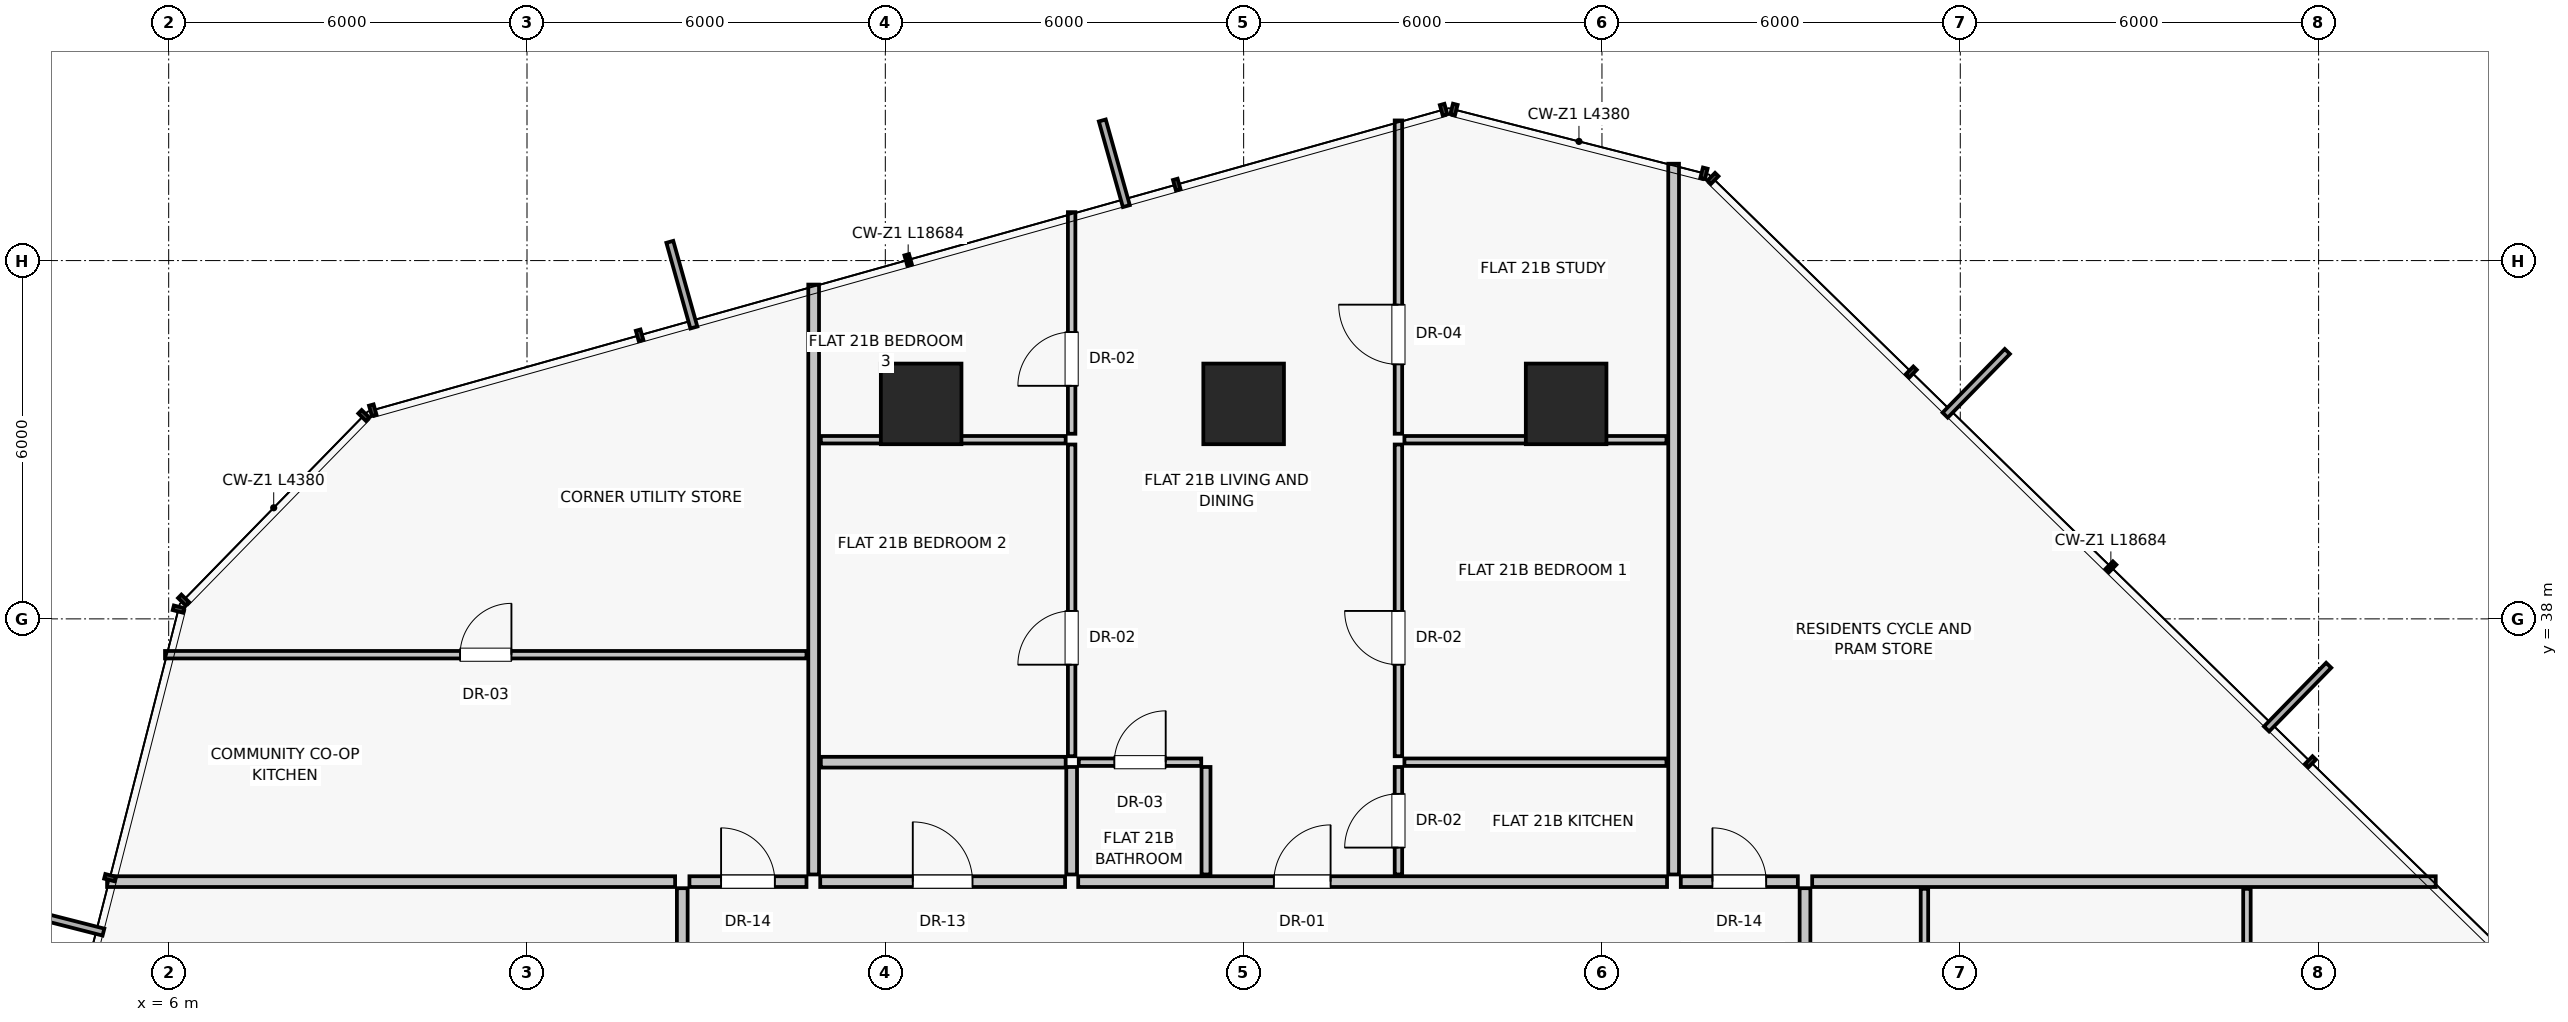
"""IFC4 building model, lengths in metres.
Left out: names, types, materials, properties, quantities, classifications, styles, units other than length and angle.
Written with IfcOpenShell. Run it as: python <this file> out.ifc"""

import sys

from ifc_helpers import new_model, si_unit, direction, frame, frame_2d, origin, origin_2d, place, context, subcontext, project, spatial, rectangle, extrude, source, transform, mapped, element, fill, save


model = new_model("IFC4")
c1 = context("Model", 3, precision=1e-05, world=origin(), true_north=direction((0.0, 1.0)))
c2 = subcontext(c1, "Body", "Model", "MODEL_VIEW")
j1 = project(units=[si_unit("LENGTHUNIT", "METRE"), si_unit("PLANEANGLEUNIT", "RADIAN")], contexts=[c1])
p1 = place(None, origin())
s1 = spatial("IfcSite", under=j1, at=p1, CompositionType="ELEMENT")
p2 = place(p1, origin())
s2 = spatial("IfcBuilding", under=s1, at=p2, CompositionType="ELEMENT")
p3 = place(p2, frame((0.0, 0.0, 77.1)))
s3 = spatial("IfcBuildingStorey", under=s2, at=p3, CompositionType="ELEMENT", Elevation=77.1)
for number, where, z_axis, x_axis in (
    (1, (29.4, 41.6, 0.0), (0.0, 0.0, 1.0), (1.0, 0.0, 0.0)),
    (2, (24.0, 41.6, 0.0), (0.0, 0.0, 1.0), (1.0, 0.0, 0.0)),
    (3, (18.6, 41.6, 0.0), (0.0, 0.0, 1.0), (1.0, 0.0, 0.0)),
):
    element("IfcColumn", number, at=place(p3, frame(where, z_axis=z_axis, x_axis=x_axis)), inside=s3, PredefinedType="COLUMN", context=c2, shape_type="SweptSolid", body=[
        extrude(rectangle(XDim=1.35, YDim=1.35, at=origin_2d()), origin(), (0.0, 0.0, 1.0), 3.25),
    ])
p4 = place(p3, frame((16.8, 33.72, 0.0), z_axis=(0.0, 0.0, 1.0), x_axis=(0.0, 1.0, 0.0)))
e4 = element("IfcWall", 4, at=p4, inside=s3, PredefinedType="PARTITIONING", context=c2, shape_type="SweptSolid", body=[
    extrude(rectangle(XDim=9.878, YDim=0.18, at=frame_2d((4.939, 0.0))), origin(), (0.0, 0.0, 1.0), 2.93),
])
p5 = place(p3, frame((31.2, 33.72, 0.0), z_axis=(0.0, 0.0, 1.0), x_axis=(0.0, 1.0, 0.0)))
e5 = element("IfcWall", 5, at=p5, inside=s3, PredefinedType="PARTITIONING", context=c2, shape_type="SweptSolid", body=[
    extrude(rectangle(XDim=11.902, YDim=0.18, at=frame_2d((5.951, 0.0))), origin(), (0.0, 0.0, 1.0), 2.93),
])
p6 = place(p3, frame((16.91, 33.6, 0.0), z_axis=(0.0, 0.0, 1.0), x_axis=(1.0, 0.0, 0.0)))
e6 = element("IfcWall", 6, at=p6, inside=s3, PredefinedType="PARTITIONING", context=c2, shape_type="SweptSolid", body=[
    extrude(rectangle(XDim=4.1, YDim=0.18, at=frame_2d((2.05, 0.0))), origin(), (0.0, 0.0, 1.0), 2.93),
])
p7 = place(p6, frame((1.55, 0.0, 0.0)))
e7 = element("IfcOpeningElement", 7, at=p7, cuts=e6, PredefinedType="OPENING", context=c2, shape_type="SweptSolid", body=[
    extrude(rectangle(XDim=1.0, YDim=2.01, at=frame_2d((0.5, 1.005))), frame((0.0, 0.1, 0.0), z_axis=(0.0, -1.0, 0.0), x_axis=(1.0, 0.0, 0.0)), (0.0, 0.0, 1.0), 0.2),
])
p8 = place(p3, frame((21.23, 33.6, 0.0), z_axis=(0.0, 0.0, 1.0), x_axis=(1.0, 0.0, 0.0)))
e8 = element("IfcWall", 8, at=p8, inside=s3, PredefinedType="PARTITIONING", context=c2, shape_type="SweptSolid", body=[
    extrude(rectangle(XDim=9.86, YDim=0.18, at=frame_2d((4.93, 0.0))), origin(), (0.0, 0.0, 1.0), 2.93),
])
p9 = place(p8, frame((3.276, 0.0, 0.0)))
e9 = element("IfcOpeningElement", 9, at=p9, cuts=e8, PredefinedType="OPENING", context=c2, shape_type="SweptSolid", body=[
    extrude(rectangle(XDim=0.95, YDim=2.02, at=frame_2d((0.475, 1.01))), frame((0.0, 0.1, 0.0), z_axis=(0.0, -1.0, 0.0), x_axis=(1.0, 0.0, 0.0)), (0.0, 0.0, 1.0), 0.2),
])
p10 = place(p3, frame((16.92, 41.0, 0.0), z_axis=(0.0, 0.0, 1.0), x_axis=(1.0, 0.0, 0.0)))
e10 = element("IfcWall", 10, at=p10, inside=s3, PredefinedType="PARTITIONING", context=c2, shape_type="SweptSolid", body=[
    extrude(rectangle(XDim=4.1, YDim=0.125, at=frame_2d((2.05, 0.0))), origin(), (0.0, 0.0, 1.0), 2.08),
])
p11 = place(p3, frame((21.12, 41.1, 0.0), z_axis=(0.0, 0.0, 1.0), x_axis=(0.0, 1.0, 0.0)))
e11 = element("IfcWall", 11, at=p11, inside=s3, PredefinedType="PARTITIONING", context=c2, shape_type="SweptSolid", body=[
    extrude(rectangle(XDim=3.711, YDim=0.125, at=frame_2d((1.855, 0.0))), origin(), (0.0, 0.0, 1.0), 2.93),
])
p12 = place(p11, frame((0.803, 0.0, 0.0)))
e12 = element("IfcOpeningElement", 12, at=p12, cuts=e11, PredefinedType="OPENING", context=c2, shape_type="SweptSolid", body=[
    extrude(rectangle(XDim=0.9, YDim=2.01, at=frame_2d((0.45, 1.005))), frame((0.0, 0.073, 0.0), z_axis=(0.0, -1.0, 0.0), x_axis=(1.0, 0.0, 0.0)), (0.0, 0.0, 1.0), 0.145),
])
p13 = place(p3, frame((26.692, 41.0, 0.0), z_axis=(0.0, 0.0, 1.0), x_axis=(1.0, 0.0, 0.0)))
e13 = element("IfcWall", 13, at=p13, inside=s3, PredefinedType="PARTITIONING", context=c2, shape_type="SweptSolid", body=[
    extrude(rectangle(XDim=4.388, YDim=0.125, at=frame_2d((2.194, 0.0))), origin(), (0.0, 0.0, 1.0), 2.08),
])
p14 = place(p3, frame((26.592, 41.1, 0.0), z_axis=(0.0, 0.0, 1.0), x_axis=(0.0, 1.0, 0.0)))
e14 = element("IfcWall", 14, at=p14, inside=s3, PredefinedType="PARTITIONING", context=c2, shape_type="SweptSolid", body=[
    extrude(rectangle(XDim=5.247, YDim=0.125, at=frame_2d((2.623, 0.0))), origin(), (0.0, 0.0, 1.0), 2.93),
])
p15 = place(p14, frame((1.162, 0.0, 0.0)))
e15 = element("IfcOpeningElement", 15, at=p15, cuts=e14, PredefinedType="OPENING", context=c2, shape_type="SweptSolid", body=[
    extrude(rectangle(XDim=1.0, YDim=2.01, at=frame_2d((0.5, 1.005))), frame((0.0, 0.073, 0.0), z_axis=(0.0, -1.0, 0.0), x_axis=(1.0, 0.0, 0.0)), (0.0, 0.0, 1.0), 0.145),
])
p16 = place(p3, frame((16.92, 35.6, 0.0), z_axis=(0.0, 0.0, 1.0), x_axis=(1.0, 0.0, 0.0)))
e16 = element("IfcWall", 16, at=p16, inside=s3, PredefinedType="PARTITIONING", context=c2, shape_type="SweptSolid", body=[
    extrude(rectangle(XDim=4.1, YDim=0.18, at=frame_2d((2.05, 0.0))), origin(), (0.0, 0.0, 1.0), 2.93),
])
p17 = place(p3, frame((21.12, 33.72, 0.0), z_axis=(0.0, 0.0, 1.0), x_axis=(0.0, 1.0, 0.0)))
e17 = element("IfcWall", 17, at=p17, inside=s3, PredefinedType="PARTITIONING", context=c2, shape_type="SweptSolid", body=[
    extrude(rectangle(XDim=1.8, YDim=0.18, at=frame_2d((0.9, 0.0))), origin(), (0.0, 0.0, 1.0), 2.93),
])
p18 = place(p3, frame((21.12, 35.7, 0.0), z_axis=(0.0, 0.0, 1.0), x_axis=(0.0, 1.0, 0.0)))
e18 = element("IfcWall", 18, at=p18, inside=s3, PredefinedType="PARTITIONING", context=c2, shape_type="SweptSolid", body=[
    extrude(rectangle(XDim=5.22, YDim=0.125, at=frame_2d((2.61, 0.0))), origin(), (0.0, 0.0, 1.0), 2.93),
])
p19 = place(p18, frame((1.533, 0.0, 0.0)))
e19 = element("IfcOpeningElement", 19, at=p19, cuts=e18, PredefinedType="OPENING", context=c2, shape_type="SweptSolid", body=[
    extrude(rectangle(XDim=0.9, YDim=2.01, at=frame_2d((0.45, 1.005))), frame((0.0, 0.073, 0.0), z_axis=(0.0, -1.0, 0.0), x_axis=(1.0, 0.0, 0.0)), (0.0, 0.0, 1.0), 0.145),
])
p20 = place(p3, frame((23.37, 33.72, 0.0), z_axis=(0.0, 0.0, 1.0), x_axis=(0.0, 1.0, 0.0)))
e20 = element("IfcWall", 20, at=p20, inside=s3, PredefinedType="PARTITIONING", context=c2, shape_type="SweptSolid", body=[
    extrude(rectangle(XDim=1.8, YDim=0.15, at=frame_2d((0.9, 0.0))), origin(), (0.0, 0.0, 1.0), 2.93),
])
p21 = place(p3, frame((21.24, 35.6, 0.0), z_axis=(0.0, 0.0, 1.0), x_axis=(1.0, 0.0, 0.0)))
e21 = element("IfcWall", 21, at=p21, inside=s3, PredefinedType="PARTITIONING", context=c2, shape_type="SweptSolid", body=[
    extrude(rectangle(XDim=2.05, YDim=0.125, at=frame_2d((1.025, 0.0))), origin(), (0.0, 0.0, 1.0), 2.93),
])
p22 = place(p21, frame((0.595, 0.0, 0.0)))
e22 = element("IfcOpeningElement", 22, at=p22, cuts=e21, PredefinedType="OPENING", context=c2, shape_type="SweptSolid", body=[
    extrude(rectangle(XDim=0.86, YDim=2.01, at=frame_2d((0.43, 1.005))), frame((0.0, 0.073, 0.0), z_axis=(0.0, -1.0, 0.0), x_axis=(1.0, 0.0, 0.0)), (0.0, 0.0, 1.0), 0.145),
])
p23 = place(p3, frame((26.592, 33.72, 0.0), z_axis=(0.0, 0.0, 1.0), x_axis=(0.0, 1.0, 0.0)))
e23 = element("IfcWall", 23, at=p23, inside=s3, PredefinedType="PARTITIONING", context=c2, shape_type="SweptSolid", body=[
    extrude(rectangle(XDim=1.8, YDim=0.125, at=frame_2d((0.9, 0.0))), origin(), (0.0, 0.0, 1.0), 2.93),
])
p24 = place(p23, frame((0.45, 0.0, 0.0)))
e24 = element("IfcOpeningElement", 24, at=p24, cuts=e23, PredefinedType="OPENING", context=c2, shape_type="SweptSolid", body=[
    extrude(rectangle(XDim=0.9, YDim=2.01, at=frame_2d((0.45, 1.005))), frame((0.0, 0.073, 0.0), z_axis=(0.0, -1.0, 0.0), x_axis=(1.0, 0.0, 0.0)), (0.0, 0.0, 1.0), 0.145),
])
p25 = place(p3, frame((26.692, 35.6, 0.0), z_axis=(0.0, 0.0, 1.0), x_axis=(1.0, 0.0, 0.0)))
e25 = element("IfcWall", 25, at=p25, inside=s3, PredefinedType="PARTITIONING", context=c2, shape_type="SweptSolid", body=[
    extrude(rectangle(XDim=4.388, YDim=0.125, at=frame_2d((2.194, 0.0))), origin(), (0.0, 0.0, 1.0), 2.93),
])
p26 = place(p3, frame((26.592, 35.7, 0.0), z_axis=(0.0, 0.0, 1.0), x_axis=(0.0, 1.0, 0.0)))
e26 = element("IfcWall", 26, at=p26, inside=s3, PredefinedType="PARTITIONING", context=c2, shape_type="SweptSolid", body=[
    extrude(rectangle(XDim=5.22, YDim=0.125, at=frame_2d((2.61, 0.0))), origin(), (0.0, 0.0, 1.0), 2.93),
])
p27 = place(p26, frame((1.533, 0.0, 0.0)))
e27 = element("IfcOpeningElement", 27, at=p27, cuts=e26, PredefinedType="OPENING", context=c2, shape_type="SweptSolid", body=[
    extrude(rectangle(XDim=0.9, YDim=2.01, at=frame_2d((0.45, 1.005))), frame((0.0, 0.073, 0.0), z_axis=(0.0, -1.0, 0.0), x_axis=(1.0, 0.0, 0.0)), (0.0, 0.0, 1.0), 0.145),
])
p28 = place(p3, frame((14.48, 33.6, 0.0), z_axis=(0.0, 0.0, 1.0), x_axis=(-1.0, 0.0, 0.0)))
e28 = element("IfcWall", 28, at=p28, inside=s3, PredefinedType="PARTITIONING", context=c2, shape_type="SweptSolid", body=[
    extrude(rectangle(XDim=9.511, YDim=0.18, at=frame_2d((4.756, 0.0))), origin(), (0.0, 0.0, 1.0), 2.93),
])
p29 = place(p3, frame((14.6, 24.11, 0.0), z_axis=(0.0, 0.0, 1.0), x_axis=(0.0, 1.0, 0.0)))
e29 = element("IfcWall", 29, at=p29, inside=s3, PredefinedType="PARTITIONING", context=c2, shape_type="SweptSolid", body=[
    extrude(rectangle(XDim=9.38, YDim=0.18, at=frame_2d((4.69, 0.0))), origin(), (0.0, 0.0, 1.0), 2.93),
])
p30 = place(p29, frame((4.19, 0.0, 0.0)))
e30 = element("IfcOpeningElement", 30, at=p30, cuts=e29, PredefinedType="OPENING", context=c2, shape_type="SweptSolid", body=[
    extrude(rectangle(XDim=1.0, YDim=2.01, at=frame_2d((0.5, 1.005))), frame((0.0, 0.1, 0.0), z_axis=(0.0, -1.0, 0.0), x_axis=(1.0, 0.0, 0.0)), (0.0, 0.0, 1.0), 0.2),
])
p31 = place(p3, frame((33.52, 33.6, 0.0), z_axis=(0.0, 0.0, 1.0), x_axis=(1.0, 0.0, 0.0)))
e31 = element("IfcWall", 31, at=p31, inside=s3, PredefinedType="PARTITIONING", context=c2, shape_type="SweptSolid", body=[
    extrude(rectangle(XDim=10.441, YDim=0.18, at=frame_2d((5.221, 0.0))), origin(), (0.0, 0.0, 1.0), 2.93),
])
p32 = place(p3, frame((33.4, 18.71, 0.0), z_axis=(0.0, 0.0, 1.0), x_axis=(0.0, 1.0, 0.0)))
e32 = element("IfcWall", 32, at=p32, inside=s3, PredefinedType="PARTITIONING", context=c2, shape_type="SweptSolid", body=[
    extrude(rectangle(XDim=14.78, YDim=0.18, at=frame_2d((7.39, 0.0))), origin(), (0.0, 0.0, 1.0), 2.93),
])
p33 = place(p32, frame((5.94, 0.0, 0.0)))
e33 = element("IfcOpeningElement", 33, at=p33, cuts=e32, PredefinedType="OPENING", context=c2, shape_type="SweptSolid", body=[
    extrude(rectangle(XDim=0.95, YDim=2.02, at=frame_2d((0.475, 1.01))), frame((0.0, 0.1, 0.0), z_axis=(0.0, -1.0, 0.0), x_axis=(1.0, 0.0, 0.0)), (0.0, 0.0, 1.0), 0.2),
])
for number, where, z_axis, x_axis in (
    (34, (40.8, 29.5, 0.0), (0.0, 0.0, 1.0), (0.0, 1.0, 0.0)),
    (35, (35.4, 29.5, 0.0), (0.0, 0.0, 1.0), (0.0, 1.0, 0.0)),
):
    element("IfcWall", number, at=place(p3, frame(where, z_axis=z_axis, x_axis=x_axis)), inside=s3, PredefinedType="PARTITIONING", context=c2, shape_type="SweptSolid", body=[
        extrude(rectangle(XDim=3.98, YDim=0.125, at=frame_2d((1.99, 0.0))), origin(), (0.0, 0.0, 1.0), 2.93),
    ])
p34 = place(p3, frame((14.72, 33.6, 0.0), z_axis=(0.0, 0.0, 1.0), x_axis=(1.0, 0.0, 0.0)))
e36 = element("IfcWall", 36, at=p34, inside=s3, PredefinedType="PARTITIONING", context=c2, shape_type="SweptSolid", body=[
    extrude(rectangle(XDim=1.96, YDim=0.18, at=frame_2d((0.98, 0.0))), origin(), (0.0, 0.0, 1.0), 2.93),
])
p35 = place(p34, frame((0.53, 0.0, 0.0)))
e37 = element("IfcOpeningElement", 37, at=p35, cuts=e36, PredefinedType="OPENING", context=c2, shape_type="SweptSolid", body=[
    extrude(rectangle(XDim=0.9, YDim=2.01, at=frame_2d((0.45, 1.005))), frame((0.0, 0.1, 0.0), z_axis=(0.0, -1.0, 0.0), x_axis=(1.0, 0.0, 0.0)), (0.0, 0.0, 1.0), 0.2),
])
p36 = place(p3, frame((5.938, 37.4, 0.0), z_axis=(0.0, 0.0, 1.0), x_axis=(1.0, 0.0, 0.0)))
e38 = element("IfcWall", 38, at=p36, inside=s3, PredefinedType="PARTITIONING", context=c2, shape_type="SweptSolid", body=[
    extrude(rectangle(XDim=10.741, YDim=0.125, at=frame_2d((5.371, 0.0))), origin(), (0.0, 0.0, 1.0), 2.93),
])
p37 = place(p36, frame((4.941, 0.0, 0.0)))
e39 = element("IfcOpeningElement", 39, at=p37, cuts=e38, PredefinedType="OPENING", context=c2, shape_type="SweptSolid", body=[
    extrude(rectangle(XDim=0.86, YDim=2.01, at=frame_2d((0.43, 1.005))), frame((0.0, 0.073, 0.0), z_axis=(0.0, -1.0, 0.0), x_axis=(1.0, 0.0, 0.0)), (0.0, 0.0, 1.0), 0.145),
])
p38 = place(p3, frame((31.32, 33.6, 0.0), z_axis=(0.0, 0.0, 1.0), x_axis=(1.0, 0.0, 0.0)))
e40 = element("IfcWall", 40, at=p38, inside=s3, PredefinedType="PARTITIONING", context=c2, shape_type="SweptSolid", body=[
    extrude(rectangle(XDim=1.96, YDim=0.18, at=frame_2d((0.98, 0.0))), origin(), (0.0, 0.0, 1.0), 2.93),
])
p39 = place(p38, frame((0.53, 0.0, 0.0)))
e41 = element("IfcOpeningElement", 41, at=p39, cuts=e40, PredefinedType="OPENING", context=c2, shape_type="SweptSolid", body=[
    extrude(rectangle(XDim=0.9, YDim=2.01, at=frame_2d((0.45, 1.005))), frame((0.0, 0.1, 0.0), z_axis=(0.0, -1.0, 0.0), x_axis=(1.0, 0.0, 0.0)), (0.0, 0.0, 1.0), 0.2),
])
m1 = source(origin(), c2, "Body", "SweptSolid", [
    extrude(rectangle(XDim=1.0, YDim=2.01, at=frame_2d((0.5, 1.005))), frame((0.0, 0.025, 0.0), z_axis=(0.0, -1.0, 0.0), x_axis=(1.0, 0.0, 0.0)), (0.0, 0.0, 1.0), 0.05),
])
p40 = place(p7, origin())
e42 = element("IfcDoor", 42, at=p40, inside=s3, OperationType="SINGLE_SWING_LEFT", PredefinedType="DOOR", context=c2, shape_type="MappedRepresentation", body=[
    mapped(m1, transform((0.0, 0.0, 0.0), scale=1.0)),
])
fill(e7, e42)
m2 = source(origin(), c2, "Body", "SweptSolid", [
    extrude(rectangle(XDim=0.95, YDim=2.02, at=frame_2d((0.475, 1.01))), frame((0.0, 0.025, 0.0), z_axis=(0.0, -1.0, 0.0), x_axis=(1.0, 0.0, 0.0)), (0.0, 0.0, 1.0), 0.05),
])
p41 = place(p9, origin())
e43 = element("IfcDoor", 43, at=p41, inside=s3, OperationType="SINGLE_SWING_RIGHT", PredefinedType="DOOR", context=c2, shape_type="MappedRepresentation", body=[
    mapped(m2, transform((0.0, 0.0, 0.0), scale=1.0)),
])
fill(e9, e43)
m3 = source(origin(), c2, "Body", "SweptSolid", [
    extrude(rectangle(XDim=0.9, YDim=2.01, at=frame_2d((0.45, 1.005))), frame((0.0, 0.025, 0.0), z_axis=(0.0, -1.0, 0.0), x_axis=(1.0, 0.0, 0.0)), (0.0, 0.0, 1.0), 0.05),
])
p42 = place(p12, origin())
e44 = element("IfcDoor", 44, at=p42, inside=s3, OperationType="SINGLE_SWING_LEFT", PredefinedType="DOOR", context=c2, shape_type="MappedRepresentation", body=[
    mapped(m3, transform((0.0, 0.0, 0.0), scale=1.0)),
])
fill(e12, e44)
p43 = place(p15, origin())
e45 = element("IfcDoor", 45, at=p43, inside=s3, OperationType="SINGLE_SWING_RIGHT", PredefinedType="DOOR", context=c2, shape_type="MappedRepresentation", body=[
    mapped(m1, transform((0.0, 0.0, 0.0), scale=1.0)),
])
fill(e15, e45)
p44 = place(p19, origin())
e46 = element("IfcDoor", 46, at=p44, inside=s3, OperationType="SINGLE_SWING_LEFT", PredefinedType="DOOR", context=c2, shape_type="MappedRepresentation", body=[
    mapped(m3, transform((0.0, 0.0, 0.0), scale=1.0)),
])
fill(e19, e46)
m4 = source(origin(), c2, "Body", "SweptSolid", [
    extrude(rectangle(XDim=0.86, YDim=2.01, at=frame_2d((0.43, 1.005))), frame((0.0, 0.025, 0.0), z_axis=(0.0, -1.0, 0.0), x_axis=(1.0, 0.0, 0.0)), (0.0, 0.0, 1.0), 0.05),
])
p45 = place(p22, origin())
e47 = element("IfcDoor", 47, at=p45, inside=s3, OperationType="SINGLE_SWING_RIGHT", PredefinedType="DOOR", context=c2, shape_type="MappedRepresentation", body=[
    mapped(m4, transform((0.0, 0.0, 0.0), scale=1.0)),
])
fill(e22, e47)
p46 = place(p24, origin())
e48 = element("IfcDoor", 48, at=p46, inside=s3, OperationType="SINGLE_SWING_LEFT", PredefinedType="DOOR", context=c2, shape_type="MappedRepresentation", body=[
    mapped(m3, transform((0.0, 0.0, 0.0), scale=1.0)),
])
fill(e24, e48)
p47 = place(p27, origin())
e49 = element("IfcDoor", 49, at=p47, inside=s3, OperationType="SINGLE_SWING_RIGHT", PredefinedType="DOOR", context=c2, shape_type="MappedRepresentation", body=[
    mapped(m3, transform((0.0, 0.0, 0.0), scale=1.0)),
])
fill(e27, e49)
p48 = place(p35, origin())
e50 = element("IfcDoor", 50, at=p48, inside=s3, OperationType="SINGLE_SWING_LEFT", PredefinedType="DOOR", context=c2, shape_type="MappedRepresentation", body=[
    mapped(m3, transform((0.0, 0.0, 0.0), scale=1.0)),
])
fill(e37, e50)
p49 = place(p37, origin())
e51 = element("IfcDoor", 51, at=p49, inside=s3, OperationType="SINGLE_SWING_RIGHT", PredefinedType="DOOR", context=c2, shape_type="MappedRepresentation", body=[
    mapped(m4, transform((0.0, 0.0, 0.0), scale=1.0)),
])
fill(e39, e51)
p50 = place(p39, origin())
e52 = element("IfcDoor", 52, at=p50, inside=s3, OperationType="SINGLE_SWING_LEFT", PredefinedType="DOOR", context=c2, shape_type="MappedRepresentation", body=[
    mapped(m3, transform((0.0, 0.0, 0.0), scale=1.0)),
])
fill(e41, e52)
save(model, sys.argv[1])
